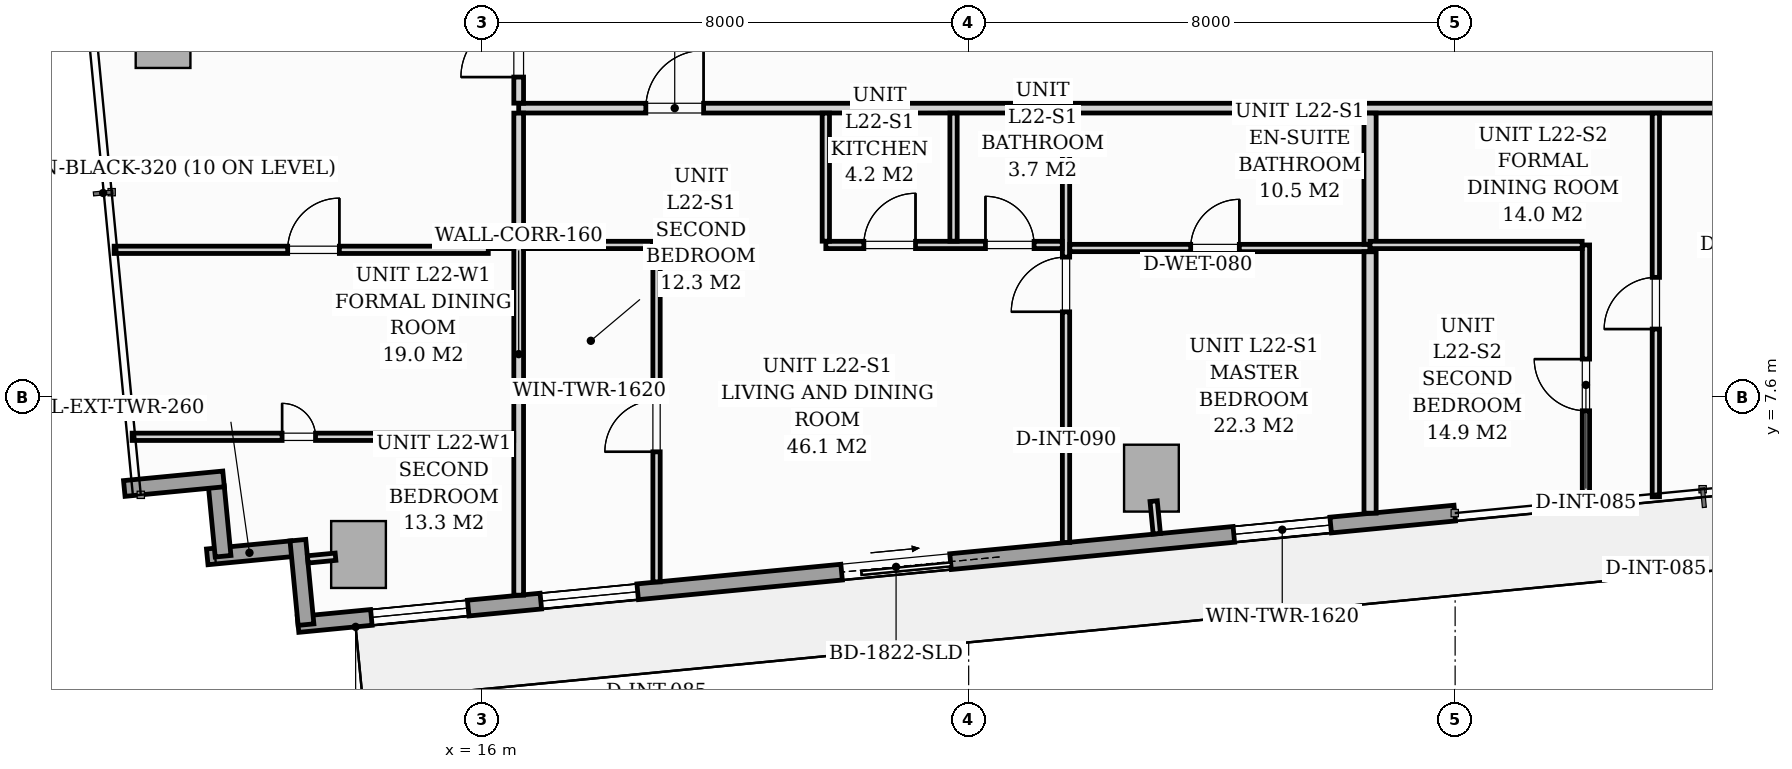
"""IFC4 building model, lengths in metres.
Left out: names, types, materials, properties, quantities, classifications, styles, units other than length and angle.
Written with IfcOpenShell. Run it as: python <this file> out.ifc"""

import sys

from ifc_helpers import new_model, si_unit, direction, frame, frame_2d, origin, origin_2d, place, context, subcontext, project, spatial, rectangle, extrude, source, transform, mapped, element, fill, save


model = new_model("IFC4")
c1 = context("Model", 3, precision=1e-05, world=origin(), true_north=direction((0.0, 1.0)))
c2 = subcontext(c1, "Body", "Model", "MODEL_VIEW")
j1 = project(units=[si_unit("LENGTHUNIT", "METRE"), si_unit("PLANEANGLEUNIT", "RADIAN")], contexts=[c1])
p1 = place(None, origin())
s1 = spatial("IfcSite", under=j1, at=p1, CompositionType="ELEMENT")
p2 = place(p1, origin())
s2 = spatial("IfcBuilding", under=s1, at=p2, CompositionType="ELEMENT")
p3 = place(p2, frame((0.0, 0.0, 81.0)))
s3 = spatial("IfcBuildingStorey", under=s2, at=p3, CompositionType="ELEMENT", Elevation=81.0)
m1 = source(origin(), c2, "Body", "SweptSolid", [
    extrude(rectangle(XDim=0.9, YDim=1.1, at=origin_2d()), origin(), (0.0, 0.0, 1.0), 3.196),
])
for number, where, z_axis, x_axis in (
    (1, (13.966, 5.01, 0.002), (0.0, 0.0, 1.0), (0.995, 0.096, 0.0)),
    (2, (27.006, 6.265, 0.002), (0.0, 0.0, 1.0), (0.995, 0.096, 0.0)),
    (3, (10.752, 13.561, 0.002), (0.0, 0.0, 1.0), (0.995, 0.096, 0.0)),
):
    element("IfcColumn", number, at=place(p3, frame(where, z_axis=z_axis, x_axis=x_axis)), inside=s3, PredefinedType="COLUMN", context=c2, shape_type="MappedRepresentation", body=[
        mapped(m1, transform((0.0, 0.0, 0.0), scale=1.0)),
    ])
p4 = place(p3, frame((12.867, 5.104, 0.0), z_axis=(0.0, 0.0, 1.0), x_axis=(-0.995389446633, -0.095915846097, 0.0)))
e4 = element("IfcWall", 4, at=p4, inside=s3, PredefinedType="STANDARD", context=c2, shape_type="SweptSolid", body=[
    extrude(rectangle(XDim=1.395, YDim=0.26, at=frame_2d((0.697, 0.0))), origin(), (0.0, 0.0, 1.0), 2.94),
])
p5 = place(p3, frame((11.739, 4.981, 0.0), z_axis=(0.0, 0.0, 1.0), x_axis=(-0.09576095695, 0.995404359607, 0.0)))
e5 = element("IfcWall", 5, at=p5, inside=s3, PredefinedType="STANDARD", context=c2, shape_type="SweptSolid", body=[
    extrude(rectangle(XDim=1.15, YDim=0.26, at=frame_2d((0.575, 0.0))), origin(), (0.0, 0.0, 1.0), 2.94),
])
p6 = place(p3, frame((11.747, 6.252, 0.0), z_axis=(0.0, 0.0, 1.0), x_axis=(-0.995394563142, -0.095862733462, 0.0)))
e6 = element("IfcWall", 6, at=p6, inside=s3, PredefinedType="STANDARD", context=c2, shape_type="SweptSolid", body=[
    extrude(rectangle(XDim=1.64, YDim=0.26, at=frame_2d((0.82, 0.0))), origin(), (0.0, 0.0, 1.0), 2.94),
])
p7 = place(p3, frame((31.994, 5.69, 0.0), z_axis=(0.0, 0.0, 1.0), x_axis=(-0.995396521236, -0.095842399342, 0.0)))
e7 = element("IfcWall", 7, at=p7, inside=s3, PredefinedType="STANDARD", context=c2, shape_type="SweptSolid", body=[
    extrude(rectangle(XDim=19.11, YDim=0.26, at=frame_2d((9.555, 0.0))), origin(), (0.0, 0.0, 1.0), 2.94),
])
p8 = place(p7, frame((8.33, 0.0, 0.0)))
e8 = element("IfcOpeningElement", 8, at=p8, cuts=e7, PredefinedType="OPENING", context=c2, shape_type="SweptSolid", body=[
    extrude(rectangle(XDim=1.8, YDim=2.06, at=frame_2d((0.9, 1.03))), frame((0.0, 0.14, 0.0), z_axis=(0.0, -1.0, 0.0), x_axis=(1.0, 0.0, 0.0)), (0.0, 0.0, 1.0), 0.28),
])
p9 = place(p7, frame((2.05, 0.0, 0.65)))
e9 = element("IfcOpeningElement", 9, at=p9, cuts=e7, PredefinedType="OPENING", context=c2, shape_type="SweptSolid", body=[
    extrude(rectangle(XDim=1.6, YDim=1.5, at=frame_2d((0.8, 0.75))), frame((0.0, 0.14, 0.0), z_axis=(0.0, -1.0, 0.0), x_axis=(1.0, 0.0, 0.0)), (0.0, 0.0, 1.0), 0.28),
])
p10 = place(p7, frame((13.499, 0.0, 0.75)))
e10 = element("IfcOpeningElement", 10, at=p10, cuts=e7, PredefinedType="OPENING", context=c2, shape_type="SweptSolid", body=[
    extrude(rectangle(XDim=1.6, YDim=1.5, at=frame_2d((0.8, 0.75))), frame((0.0, 0.14, 0.0), z_axis=(0.0, -1.0, 0.0), x_axis=(1.0, 0.0, 0.0)), (0.0, 0.0, 1.0), 0.28),
])
p11 = place(p7, frame((16.299, 0.0, 0.75)))
e11 = element("IfcOpeningElement", 11, at=p11, cuts=e7, PredefinedType="OPENING", context=c2, shape_type="SweptSolid", body=[
    extrude(rectangle(XDim=1.6, YDim=1.5, at=frame_2d((0.8, 0.75))), frame((0.0, 0.14, 0.0), z_axis=(0.0, -1.0, 0.0), x_axis=(1.0, 0.0, 0.0)), (0.0, 0.0, 1.0), 0.28),
])
p12 = place(p3, frame((13.103, 3.856, 0.0), z_axis=(0.0, 0.0, 1.0), x_axis=(-0.09589913835, 0.995391056452, 0.0)))
e12 = element("IfcWall", 12, at=p12, inside=s3, PredefinedType="STANDARD", context=c2, shape_type="SweptSolid", body=[
    extrude(rectangle(XDim=1.395, YDim=0.26, at=frame_2d((0.698, 0.0))), origin(), (0.0, 0.0, 1.0), 2.94),
])
p13 = place(p3, frame((16.6, 12.35, 0.0), z_axis=(0.0, 0.0, 1.0), x_axis=(1.0, 0.0, 0.0)))
e13 = element("IfcWall", 13, at=p13, inside=s3, PredefinedType="PARTITIONING", context=c2, shape_type="SweptSolid", body=[
    extrude(rectangle(XDim=37.6, YDim=0.16, at=frame_2d((18.8, 0.0))), origin(), (0.0, 0.0, 1.0), 2.94),
])
p14 = place(p13, frame((2.091, 0.0, 0.0)))
e14 = element("IfcOpeningElement", 14, at=p14, cuts=e13, PredefinedType="OPENING", context=c2, shape_type="SweptSolid", body=[
    extrude(rectangle(XDim=0.95, YDim=2.06, at=frame_2d((0.475, 1.03))), frame((0.0, 0.09, 0.0), z_axis=(0.0, -1.0, 0.0), x_axis=(1.0, 0.0, 0.0)), (0.0, 0.0, 1.0), 0.18),
])
p15 = place(p13, frame((26.146, 0.0, 0.0)))
e15 = element("IfcOpeningElement", 15, at=p15, cuts=e13, PredefinedType="OPENING", context=c2, shape_type="SweptSolid", body=[
    extrude(rectangle(XDim=0.95, YDim=2.06, at=frame_2d((0.475, 1.03))), frame((0.0, 0.09, 0.0), z_axis=(0.0, -1.0, 0.0), x_axis=(1.0, 0.0, 0.0)), (0.0, 0.0, 1.0), 0.18),
])
p16 = place(p3, frame((16.6, 4.341, 0.0), z_axis=(0.0, 0.0, 1.0), x_axis=(0.0, 1.0, 0.0)))
e16 = element("IfcWall", 16, at=p16, inside=s3, PredefinedType="PARTITIONING", context=c2, shape_type="SweptSolid", body=[
    extrude(rectangle(XDim=7.927, YDim=0.16, at=frame_2d((3.964, 0.0))), origin(), (0.0, 0.0, 1.0), 2.94),
])
p17 = place(p3, frame((16.6, 12.432, 0.0), z_axis=(0.0, 0.0, 1.0), x_axis=(0.0, 1.0, 0.0)))
e17 = element("IfcWall", 17, at=p17, inside=s3, PredefinedType="PARTITIONING", context=c2, shape_type="SweptSolid", body=[
    extrude(rectangle(XDim=11.475, YDim=0.16, at=frame_2d((5.738, 0.0))), origin(), (0.0, 0.0, 1.0), 2.94),
])
p18 = place(p17, frame((0.429, 0.0, 0.0)))
e18 = element("IfcOpeningElement", 18, at=p18, cuts=e17, PredefinedType="OPENING", context=c2, shape_type="SweptSolid", body=[
    extrude(rectangle(XDim=0.95, YDim=2.06, at=frame_2d((0.475, 1.03))), frame((0.0, 0.09, 0.0), z_axis=(0.0, -1.0, 0.0), x_axis=(1.0, 0.0, 0.0)), (0.0, 0.0, 1.0), 0.18),
])
p19 = place(p3, frame((25.601, 5.208, 0.0), z_axis=(0.0, 0.0, 1.0), x_axis=(0.0, 1.0, 0.0)))
e19 = element("IfcWall", 19, at=p19, inside=s3, PredefinedType="PARTITIONING", context=c2, shape_type="SweptSolid", body=[
    extrude(rectangle(XDim=7.061, YDim=0.12, at=frame_2d((3.53, 0.0))), origin(), (0.0, 0.0, 1.0), 2.94),
])
p20 = place(p19, frame((3.792, 0.0, 0.0)))
e20 = element("IfcOpeningElement", 20, at=p20, cuts=e19, PredefinedType="OPENING", context=c2, shape_type="SweptSolid", body=[
    extrude(rectangle(XDim=0.9, YDim=2.05, at=frame_2d((0.45, 1.025))), frame((0.0, 0.07, 0.0), z_axis=(0.0, -1.0, 0.0), x_axis=(1.0, 0.0, 0.0)), (0.0, 0.0, 1.0), 0.14),
])
p21 = place(p3, frame((21.651, 10.1, 0.0), z_axis=(0.0, 0.0, 1.0), x_axis=(1.0, 0.0, 0.0)))
e21 = element("IfcWall", 21, at=p21, inside=s3, PredefinedType="PARTITIONING", context=c2, shape_type="SweptSolid", body=[
    extrude(rectangle(XDim=3.888, YDim=0.12, at=frame_2d((1.944, 0.0))), origin(), (0.0, 0.0, 1.0), 2.94),
])
p22 = place(p21, frame((0.625, 0.0, 0.0)))
e22 = element("IfcOpeningElement", 22, at=p22, cuts=e21, PredefinedType="OPENING", context=c2, shape_type="SweptSolid", body=[
    extrude(rectangle(XDim=0.85, YDim=2.05, at=frame_2d((0.425, 1.025))), frame((0.0, 0.07, 0.0), z_axis=(0.0, -1.0, 0.0), x_axis=(1.0, 0.0, 0.0)), (0.0, 0.0, 1.0), 0.14),
])
p23 = place(p21, frame((2.625, 0.0, 0.0)))
e23 = element("IfcOpeningElement", 23, at=p23, cuts=e21, PredefinedType="OPENING", context=c2, shape_type="SweptSolid", body=[
    extrude(rectangle(XDim=0.8, YDim=2.02, at=frame_2d((0.4, 1.01))), frame((0.0, 0.07, 0.0), z_axis=(0.0, -1.0, 0.0), x_axis=(1.0, 0.0, 0.0)), (0.0, 0.0, 1.0), 0.14),
])
for number, where, z_axis, x_axis in (
    (24, (23.751, 10.162, 0.0), (0.0, 0.0, 1.0), (0.0, 1.0, 0.0)),
    (25, (21.651, 10.162, 0.0), (0.0, 0.0, 1.0), (0.0, 1.0, 0.0)),
):
    element("IfcWall", number, at=place(p3, frame(where, z_axis=z_axis, x_axis=x_axis)), inside=s3, PredefinedType="PARTITIONING", context=c2, shape_type="SweptSolid", body=[
        extrude(rectangle(XDim=2.106, YDim=0.12, at=frame_2d((1.053, 0.0))), origin(), (0.0, 0.0, 1.0), 2.94),
    ])
p24 = place(p3, frame((25.663, 10.05, 0.0), z_axis=(0.0, 0.0, 1.0), x_axis=(1.0, 0.0, 0.0)))
e26 = element("IfcWall", 26, at=p24, inside=s3, PredefinedType="PARTITIONING", context=c2, shape_type="SweptSolid", body=[
    extrude(rectangle(XDim=4.938, YDim=0.12, at=frame_2d((2.469, 0.0))), origin(), (0.0, 0.0, 1.0), 2.94),
])
p25 = place(p24, frame((1.988, 0.0, 0.0)))
e27 = element("IfcOpeningElement", 27, at=p25, cuts=e26, PredefinedType="OPENING", context=c2, shape_type="SweptSolid", body=[
    extrude(rectangle(XDim=0.8, YDim=2.02, at=frame_2d((0.4, 1.01))), frame((0.0, 0.07, 0.0), z_axis=(0.0, -1.0, 0.0), x_axis=(1.0, 0.0, 0.0)), (0.0, 0.0, 1.0), 0.14),
])
p26 = place(p3, frame((18.867, 4.559, 0.0), z_axis=(0.0, 0.0, 1.0), x_axis=(0.0, 1.0, 0.0)))
e28 = element("IfcWall", 28, at=p26, inside=s3, PredefinedType="PARTITIONING", context=c2, shape_type="SweptSolid", body=[
    extrude(rectangle(XDim=5.541, YDim=0.12, at=frame_2d((2.771, 0.0))), origin(), (0.0, 0.0, 1.0), 2.94),
])
p27 = place(p26, frame((2.139, 0.0, 0.0)))
e29 = element("IfcOpeningElement", 29, at=p27, cuts=e28, PredefinedType="OPENING", context=c2, shape_type="SweptSolid", body=[
    extrude(rectangle(XDim=0.85, YDim=2.05, at=frame_2d((0.425, 1.025))), frame((0.0, 0.07, 0.0), z_axis=(0.0, -1.0, 0.0), x_axis=(1.0, 0.0, 0.0)), (0.0, 0.0, 1.0), 0.14),
])
p28 = place(p3, frame((16.1, 10.1, 0.0), z_axis=(0.0, 0.0, 1.0), x_axis=(1.0, 0.0, 0.0)))
e30 = element("IfcWall", 30, at=p28, inside=s3, PredefinedType="PARTITIONING", context=c2, shape_type="SweptSolid", body=[
    extrude(rectangle(XDim=0.418, YDim=0.12, at=frame_2d((0.209, 0.0))), origin(), (0.0, 0.0, 1.0), 2.94),
])
p29 = place(p3, frame((16.682, 10.1, 0.0), z_axis=(0.0, 0.0, 1.0), x_axis=(1.0, 0.0, 0.0)))
e31 = element("IfcWall", 31, at=p29, inside=s3, PredefinedType="PARTITIONING", context=c2, shape_type="SweptSolid", body=[
    extrude(rectangle(XDim=2.123, YDim=0.12, at=frame_2d((1.062, 0.0))), origin(), (0.0, 0.0, 1.0), 2.94),
])
p30 = place(p3, frame((30.601, 5.689, 0.0), z_axis=(0.0, 0.0, 1.0), x_axis=(0.0, 1.0, 0.0)))
e32 = element("IfcWall", 32, at=p30, inside=s3, PredefinedType="PARTITIONING", context=c2, shape_type="SweptSolid", body=[
    extrude(rectangle(XDim=4.299, YDim=0.2, at=frame_2d((2.149, 0.0))), origin(), (0.0, 0.0, 1.0), 2.94),
])
p31 = place(p3, frame((30.601, 10.112, 0.0), z_axis=(0.0, 0.0, 1.0), x_axis=(0.0, 1.0, 0.0)))
e33 = element("IfcWall", 33, at=p31, inside=s3, PredefinedType="PARTITIONING", context=c2, shape_type="SweptSolid", body=[
    extrude(rectangle(XDim=2.156, YDim=0.2, at=frame_2d((1.078, 0.0))), origin(), (0.0, 0.0, 1.0), 2.94),
])
p32 = place(p3, frame((34.151, 5.848, 0.0), z_axis=(0.0, 0.0, 1.0), x_axis=(0.0, 1.0, 0.0)))
e34 = element("IfcWall", 34, at=p32, inside=s3, PredefinedType="PARTITIONING", context=c2, shape_type="SweptSolid", body=[
    extrude(rectangle(XDim=4.252, YDim=0.12, at=frame_2d((2.126, 0.0))), origin(), (0.0, 0.0, 1.0), 2.94),
])
p33 = place(p32, frame((1.525, 0.0, 0.0)))
e35 = element("IfcOpeningElement", 35, at=p33, cuts=e34, PredefinedType="OPENING", context=c2, shape_type="SweptSolid", body=[
    extrude(rectangle(XDim=0.85, YDim=2.05, at=frame_2d((0.425, 1.025))), frame((0.0, 0.07, 0.0), z_axis=(0.0, -1.0, 0.0), x_axis=(1.0, 0.0, 0.0)), (0.0, 0.0, 1.0), 0.14),
])
p34 = place(p3, frame((30.601, 10.1, 0.0), z_axis=(0.0, 0.0, 1.0), x_axis=(1.0, 0.0, 0.0)))
e36 = element("IfcWall", 36, at=p34, inside=s3, PredefinedType="PARTITIONING", context=c2, shape_type="SweptSolid", body=[
    extrude(rectangle(XDim=3.488, YDim=0.12, at=frame_2d((1.744, 0.0))), origin(), (0.0, 0.0, 1.0), 2.94),
])
p35 = place(p3, frame((35.301, 5.958, 0.0), z_axis=(0.0, 0.0, 1.0), x_axis=(0.0, 1.0, 0.0)))
e37 = element("IfcWall", 37, at=p35, inside=s3, PredefinedType="PARTITIONING", context=c2, shape_type="SweptSolid", body=[
    extrude(rectangle(XDim=6.31, YDim=0.12, at=frame_2d((3.155, 0.0))), origin(), (0.0, 0.0, 1.0), 2.94),
])
p36 = place(p35, frame((2.758, 0.0, 0.0)))
e38 = element("IfcOpeningElement", 38, at=p36, cuts=e37, PredefinedType="OPENING", context=c2, shape_type="SweptSolid", body=[
    extrude(rectangle(XDim=0.85, YDim=2.05, at=frame_2d((0.425, 1.025))), frame((0.0, 0.07, 0.0), z_axis=(0.0, -1.0, 0.0), x_axis=(1.0, 0.0, 0.0)), (0.0, 0.0, 1.0), 0.14),
])
p37 = place(p3, frame((10.243, 6.945, 0.0), z_axis=(0.0, 0.0, 1.0), x_axis=(1.0, 0.0, 0.0)))
e39 = element("IfcWall", 39, at=p37, inside=s3, PredefinedType="PARTITIONING", context=c2, shape_type="SweptSolid", body=[
    extrude(rectangle(XDim=6.275, YDim=0.12, at=frame_2d((3.137, 0.0))), origin(), (0.0, 0.0, 1.0), 2.94),
])
p38 = place(p37, frame((2.466, 0.0, 0.0)))
e40 = element("IfcOpeningElement", 40, at=p38, cuts=e39, PredefinedType="OPENING", context=c2, shape_type="SweptSolid", body=[
    extrude(rectangle(XDim=0.55, YDim=2.0, at=frame_2d((0.275, 1.0))), frame((0.0, 0.07, 0.0), z_axis=(0.0, -1.0, 0.0), x_axis=(1.0, 0.0, 0.0)), (0.0, 0.0, 1.0), 0.14),
])
p39 = place(p3, frame((9.947, 10.02, 0.0), z_axis=(0.0, 0.0, 1.0), x_axis=(1.0, 0.0, 0.0)))
e41 = element("IfcWall", 41, at=p39, inside=s3, PredefinedType="PARTITIONING", context=c2, shape_type="SweptSolid", body=[
    extrude(rectangle(XDim=6.153, YDim=0.12, at=frame_2d((3.076, 0.0))), origin(), (0.0, 0.0, 1.0), 2.94),
])
p40 = place(p39, frame((2.854, 0.0, 0.0)))
e42 = element("IfcOpeningElement", 42, at=p40, cuts=e41, PredefinedType="OPENING", context=c2, shape_type="SweptSolid", body=[
    extrude(rectangle(XDim=0.85, YDim=2.05, at=frame_2d((0.425, 1.025))), frame((0.0, 0.07, 0.0), z_axis=(0.0, -1.0, 0.0), x_axis=(1.0, 0.0, 0.0)), (0.0, 0.0, 1.0), 0.14),
])
p41 = place(p3, frame((13.588, 4.973, 0.0), z_axis=(0.0, 0.0, 1.0), x_axis=(-0.995435366701, -0.095438098896, 0.0)))
e43 = element("IfcWall", 43, at=p41, inside=s3, PredefinedType="PARTITIONING", context=c2, shape_type="SweptSolid", body=[
    extrude(rectangle(XDim=0.458, YDim=0.12, at=frame_2d((0.229, 0.0))), origin(), (0.0, 0.0, 1.0), 2.94),
])
p42 = place(p3, frame((27.042, 5.887, 0.0), z_axis=(0.0, 0.0, 1.0), x_axis=(0.096222656154, -0.995359834654, 0.0)))
e44 = element("IfcWall", 44, at=p42, inside=s3, PredefinedType="PARTITIONING", context=c2, shape_type="SweptSolid", body=[
    extrude(rectangle(XDim=0.538, YDim=0.12, at=frame_2d((0.269, 0.0))), origin(), (0.0, 0.0, 1.0), 2.94),
])
m2 = source(origin(), c2, "Body", "SweptSolid", [
    extrude(rectangle(XDim=1.8, YDim=2.06, at=frame_2d((0.9, 1.03))), frame((0.0, 0.025, 0.0), z_axis=(0.0, -1.0, 0.0), x_axis=(1.0, 0.0, 0.0)), (0.0, 0.0, 1.0), 0.05),
])
p43 = place(p8, origin())
e45 = element("IfcDoor", 45, at=p43, inside=s3, OperationType="SLIDING_TO_LEFT", PredefinedType="DOOR", context=c2, shape_type="MappedRepresentation", body=[
    mapped(m2, transform((0.0, 0.0, 0.0), scale=1.0)),
])
fill(e8, e45)
m3 = source(origin(), c2, "Body", "SweptSolid", [
    extrude(rectangle(XDim=1.6, YDim=1.5, at=frame_2d((0.8, 0.75))), frame((0.0, 0.03, 0.0), z_axis=(0.0, -1.0, 0.0), x_axis=(1.0, 0.0, 0.0)), (0.0, 0.0, 1.0), 0.06),
])
p44 = place(p9, origin())
e46 = element("IfcWindow", 46, at=p44, inside=s3, PartitioningType="SINGLE_PANEL", PredefinedType="WINDOW", context=c2, shape_type="MappedRepresentation", body=[
    mapped(m3, transform((0.0, 0.0, 0.0), scale=1.0)),
])
fill(e9, e46)
p45 = place(p10, origin())
e47 = element("IfcWindow", 47, at=p45, inside=s3, PartitioningType="SINGLE_PANEL", PredefinedType="WINDOW", context=c2, shape_type="MappedRepresentation", body=[
    mapped(m3, transform((0.0, 0.0, 0.0), scale=1.0)),
])
fill(e10, e47)
p46 = place(p11, origin())
e48 = element("IfcWindow", 48, at=p46, inside=s3, PartitioningType="SINGLE_PANEL", PredefinedType="WINDOW", context=c2, shape_type="MappedRepresentation", body=[
    mapped(m3, transform((0.0, 0.0, 0.0), scale=1.0)),
])
fill(e11, e48)
m4 = source(origin(), c2, "Body", "SweptSolid", [
    extrude(rectangle(XDim=0.8, YDim=2.02, at=frame_2d((0.4, 1.01))), frame((0.0, 0.025, 0.0), z_axis=(0.0, -1.0, 0.0), x_axis=(1.0, 0.0, 0.0)), (0.0, 0.0, 1.0), 0.05),
])
p47 = place(p25, origin())
e49 = element("IfcDoor", 49, at=p47, inside=s3, OperationType="SINGLE_SWING_RIGHT", PredefinedType="DOOR", context=c2, shape_type="MappedRepresentation", body=[
    mapped(m4, transform((0.0, 0.0, 0.0), scale=1.0)),
])
fill(e27, e49)
m5 = source(origin(), c2, "Body", "SweptSolid", [
    extrude(rectangle(XDim=0.85, YDim=2.05, at=frame_2d((0.425, 1.025))), frame((0.0, 0.025, 0.0), z_axis=(0.0, -1.0, 0.0), x_axis=(1.0, 0.0, 0.0)), (0.0, 0.0, 1.0), 0.05),
])
p48 = place(p27, origin())
e50 = element("IfcDoor", 50, at=p48, inside=s3, OperationType="SINGLE_SWING_LEFT", PredefinedType="DOOR", context=c2, shape_type="MappedRepresentation", body=[
    mapped(m5, transform((0.0, 0.0, 0.0), scale=1.0)),
])
fill(e29, e50)
m6 = source(origin(), c2, "Body", "SweptSolid", [
    extrude(rectangle(XDim=0.95, YDim=2.06, at=frame_2d((0.475, 1.03))), frame((0.0, 0.025, 0.0), z_axis=(0.0, -1.0, 0.0), x_axis=(1.0, 0.0, 0.0)), (0.0, 0.0, 1.0), 0.05),
])
p49 = place(p14, origin())
e51 = element("IfcDoor", 51, at=p49, inside=s3, OperationType="SINGLE_SWING_RIGHT", PredefinedType="DOOR", context=c2, shape_type="MappedRepresentation", body=[
    mapped(m6, transform((0.0, 0.0, 0.0), scale=1.0)),
])
fill(e14, e51)
m7 = source(origin(), c2, "Body", "SweptSolid", [
    extrude(rectangle(XDim=0.9, YDim=2.05, at=frame_2d((0.45, 1.025))), frame((0.0, 0.025, 0.0), z_axis=(0.0, -1.0, 0.0), x_axis=(1.0, 0.0, 0.0)), (0.0, 0.0, 1.0), 0.05),
])
p50 = place(p20, origin())
e52 = element("IfcDoor", 52, at=p50, inside=s3, OperationType="SINGLE_SWING_LEFT", PredefinedType="DOOR", context=c2, shape_type="MappedRepresentation", body=[
    mapped(m7, transform((0.0, 0.0, 0.0), scale=1.0)),
])
fill(e20, e52)
p51 = place(p22, origin())
e53 = element("IfcDoor", 53, at=p51, inside=s3, OperationType="SINGLE_SWING_RIGHT", PredefinedType="DOOR", context=c2, shape_type="MappedRepresentation", body=[
    mapped(m5, transform((0.0, 0.0, 0.0), scale=1.0)),
])
fill(e22, e53)
p52 = place(p23, origin())
e54 = element("IfcDoor", 54, at=p52, inside=s3, OperationType="SINGLE_SWING_LEFT", PredefinedType="DOOR", context=c2, shape_type="MappedRepresentation", body=[
    mapped(m4, transform((0.0, 0.0, 0.0), scale=1.0)),
])
fill(e23, e54)
p53 = place(p33, origin())
e55 = element("IfcDoor", 55, at=p53, inside=s3, OperationType="SINGLE_SWING_RIGHT", PredefinedType="DOOR", context=c2, shape_type="MappedRepresentation", body=[
    mapped(m5, transform((0.0, 0.0, 0.0), scale=1.0)),
])
fill(e35, e55)
p54 = place(p36, origin())
e56 = element("IfcDoor", 56, at=p54, inside=s3, OperationType="SINGLE_SWING_LEFT", PredefinedType="DOOR", context=c2, shape_type="MappedRepresentation", body=[
    mapped(m5, transform((0.0, 0.0, 0.0), scale=1.0)),
])
fill(e38, e56)
p55 = place(p18, origin())
e57 = element("IfcDoor", 57, at=p55, inside=s3, OperationType="SINGLE_SWING_LEFT", PredefinedType="DOOR", context=c2, shape_type="MappedRepresentation", body=[
    mapped(m6, transform((0.0, 0.0, 0.0), scale=1.0)),
])
fill(e18, e57)
m8 = source(origin(), c2, "Body", "SweptSolid", [
    extrude(rectangle(XDim=0.55, YDim=2.0, at=frame_2d((0.275, 1.0))), frame((0.0, 0.025, 0.0), z_axis=(0.0, -1.0, 0.0), x_axis=(1.0, 0.0, 0.0)), (0.0, 0.0, 1.0), 0.05),
])
p56 = place(p38, origin())
e58 = element("IfcDoor", 58, at=p56, inside=s3, OperationType="SINGLE_SWING_LEFT", PredefinedType="DOOR", context=c2, shape_type="MappedRepresentation", body=[
    mapped(m8, transform((0.0, 0.0, 0.0), scale=1.0)),
])
fill(e40, e58)
p57 = place(p40, origin())
e59 = element("IfcDoor", 59, at=p57, inside=s3, OperationType="SINGLE_SWING_RIGHT", PredefinedType="DOOR", context=c2, shape_type="MappedRepresentation", body=[
    mapped(m5, transform((0.0, 0.0, 0.0), scale=1.0)),
])
fill(e42, e59)
save(model, sys.argv[1])
